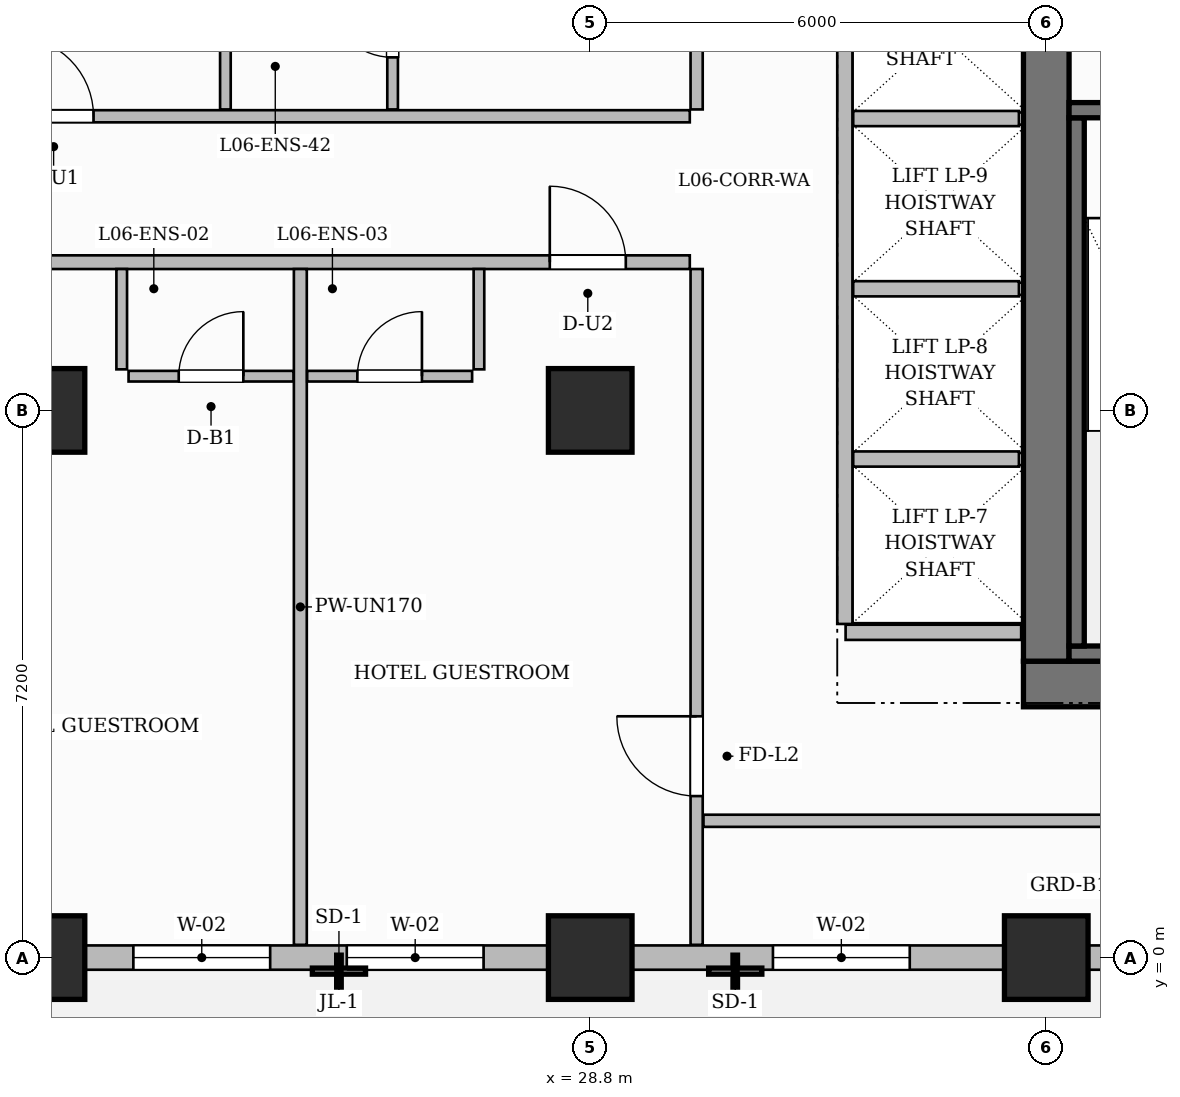
"""IFC4 building model, lengths in metres.
Left out: names, types, materials, properties, quantities, classifications, styles, units other than length and angle.
Written with IfcOpenShell. Run it as: python <this file> out.ifc"""

import sys

from ifc_helpers import new_model, si_unit, direction, frame, frame_2d, origin, origin_2d, place, context, subcontext, project, spatial, rectangle, extrude, source, transform, mapped, element, fill, save


model = new_model("IFC4")
c1 = context("Model", 3, precision=1e-05, world=origin(), true_north=direction((0.0, 1.0)))
c2 = subcontext(c1, "Body", "Model", "MODEL_VIEW")
j1 = project(units=[si_unit("LENGTHUNIT", "METRE"), si_unit("PLANEANGLEUNIT", "RADIAN")], contexts=[c1])
p1 = place(None, origin())
s1 = spatial("IfcSite", under=j1, at=p1, CompositionType="ELEMENT")
p2 = place(p1, origin())
s2 = spatial("IfcBuilding", under=s1, at=p2, CompositionType="ELEMENT")
p3 = place(p2, frame((0.0, 0.0, 32.4)))
s3 = spatial("IfcBuildingStorey", under=s2, at=p3, CompositionType="ELEMENT", Elevation=32.4)
p4 = place(p3, frame((34.5, 3.6, 0.0), z_axis=(0.0, 0.0, 1.0), x_axis=(1.0, 0.0, 0.0)))
e1 = element("IfcWall", 1, at=p4, inside=s3, PredefinedType="SHEAR", context=c2, shape_type="SweptSolid", body=[
    extrude(rectangle(XDim=15.6, YDim=0.6, at=frame_2d((7.8, 0.0))), origin(), (0.0, 0.0, 1.0), 3.7),
])
p5 = place(p4, frame((4.5, 0.0, 0.0)))
e2 = element("IfcOpeningElement", 2, at=p5, cuts=e1, PredefinedType="OPENING", context=c2, shape_type="SweptSolid", body=[
    extrude(rectangle(XDim=0.9, YDim=2.1, at=frame_2d((0.45, 1.05))), frame((0.0, 0.31, 0.0), z_axis=(0.0, -1.0, 0.0), x_axis=(1.0, 0.0, 0.0)), (0.0, 0.0, 1.0), 0.62),
])
p6 = place(p4, frame((6.95, 0.0, 0.0)))
e3 = element("IfcOpeningElement", 3, at=p6, cuts=e1, PredefinedType="OPENING", context=c2, shape_type="SweptSolid", body=[
    extrude(rectangle(XDim=0.9, YDim=2.1, at=frame_2d((0.45, 1.05))), frame((0.0, 0.31, 0.0), z_axis=(0.0, -1.0, 0.0), x_axis=(1.0, 0.0, 0.0)), (0.0, 0.0, 1.0), 0.62),
])
p7 = place(p3, frame((34.8, 3.9, 0.0), z_axis=(0.0, 0.0, 1.0), x_axis=(0.0, 1.0, 0.0)))
e4 = element("IfcWall", 4, at=p7, inside=s3, PredefinedType="SHEAR", context=c2, shape_type="SweptSolid", body=[
    extrude(rectangle(XDim=10.2, YDim=0.6, at=frame_2d((5.1, 0.0))), origin(), (0.0, 0.0, 1.0), 3.7),
])
m1 = source(origin(), c2, "Body", "SweptSolid", [
    extrude(rectangle(XDim=1.1, YDim=1.1, at=origin_2d()), origin(), (0.0, 0.0, 1.0), 3.7),
])
for number, where, z_axis, x_axis in (
    (5, (21.6, 0.0, 0.0), (0.0, 0.0, 1.0), (1.0, 0.0, 0.0)),
    (6, (21.6, 7.2, 0.0), (0.0, 0.0, 1.0), (1.0, 0.0, 0.0)),
    (7, (28.8, 0.0, 0.0), (0.0, 0.0, 1.0), (1.0, 0.0, 0.0)),
    (8, (28.8, 7.2, 0.0), (0.0, 0.0, 1.0), (1.0, 0.0, 0.0)),
    (9, (34.8, 0.0, 0.0), (0.0, 0.0, 1.0), (1.0, 0.0, 0.0)),
):
    element("IfcColumn", number, at=place(p3, frame(where, z_axis=z_axis, x_axis=x_axis)), inside=s3, PredefinedType="COLUMN", context=c2, shape_type="MappedRepresentation", body=[
        mapped(m1, transform((0.0, 0.0, 0.0), scale=1.0)),
    ])
p8 = place(p3, frame((35.1, 4.0, 0.0), z_axis=(0.0, 0.0, 1.0), x_axis=(1.0, 0.0, 0.0)))
e10 = element("IfcWall", 10, at=p8, inside=s3, PredefinedType="SHEAR", context=c2, shape_type="SweptSolid", body=[
    extrude(rectangle(XDim=3.14, YDim=0.2, at=frame_2d((1.57, 0.0))), origin(), (0.0, 0.0, 1.0), 3.7),
])
p9 = place(p3, frame((35.2, 4.1, 0.0), z_axis=(0.0, 0.0, 1.0), x_axis=(0.0, 1.0, 0.0)))
e11 = element("IfcWall", 11, at=p9, inside=s3, PredefinedType="SHEAR", context=c2, shape_type="SweptSolid", body=[
    extrude(rectangle(XDim=6.95, YDim=0.2, at=frame_2d((3.475, 0.0))), origin(), (0.0, 0.0, 1.0), 3.7),
])
p10 = place(p3, frame((35.1, 11.15, 0.0), z_axis=(0.0, 0.0, 1.0), x_axis=(1.0, 0.0, 0.0)))
e12 = element("IfcWall", 12, at=p10, inside=s3, PredefinedType="SHEAR", context=c2, shape_type="SweptSolid", body=[
    extrude(rectangle(XDim=3.14, YDim=0.2, at=frame_2d((1.57, 0.0))), origin(), (0.0, 0.0, 1.0), 3.7),
])
p11 = place(p10, frame((1.045, 0.0, 0.0)))
e13 = element("IfcOpeningElement", 13, at=p11, cuts=e12, PredefinedType="OPENING", context=c2, shape_type="SweptSolid", body=[
    extrude(rectangle(XDim=1.05, YDim=2.2, at=frame_2d((0.525, 1.1))), frame((0.0, 0.11, 0.0), z_axis=(0.0, -1.0, 0.0), x_axis=(1.0, 0.0, 0.0)), (0.0, 0.0, 1.0), 0.22),
])
p12 = place(p3, frame((32.16, 4.28, 0.0), z_axis=(0.0, 0.0, 1.0), x_axis=(1.0, 0.0, 0.0)))
e14 = element("IfcWall", 14, at=p12, inside=s3, PredefinedType="PARTITIONING", context=c2, shape_type="SweptSolid", body=[
    extrude(rectangle(XDim=2.31, YDim=0.2, at=frame_2d((1.155, 0.0))), origin(), (0.0, 0.0, 1.0), 3.45),
])
p13 = place(p3, frame((32.15, 4.39, 0.0), z_axis=(0.0, 0.0, 1.0), x_axis=(0.0, 1.0, 0.0)))
e15 = element("IfcWall", 15, at=p13, inside=s3, PredefinedType="PARTITIONING", context=c2, shape_type="SweptSolid", body=[
    extrude(rectangle(XDim=8.82, YDim=0.2, at=frame_2d((4.41, 0.0))), origin(), (0.0, 0.0, 1.0), 3.45),
])
for number, where, z_axis, x_axis in (
    (16, (32.26, 6.56, 0.0), (0.0, 0.0, 1.0), (1.0, 0.0, 0.0)),
    (17, (32.26, 8.8, 0.0), (0.0, 0.0, 1.0), (1.0, 0.0, 0.0)),
    (18, (32.26, 11.04, 0.0), (0.0, 0.0, 1.0), (1.0, 0.0, 0.0)),
):
    element("IfcWall", number, at=place(p3, frame(where, z_axis=z_axis, x_axis=x_axis)), inside=s3, PredefinedType="PARTITIONING", context=c2, shape_type="SweptSolid", body=[
        extrude(rectangle(XDim=2.18, YDim=0.2, at=frame_2d((1.09, 0.0))), origin(), (0.0, 0.0, 1.0), 3.45),
    ])
p14 = place(p3, frame((14.568, 9.15, 0.0), z_axis=(0.0, 0.0, 1.0), x_axis=(1.0, 0.0, 0.0)))
e19 = element("IfcWall", 19, at=p14, inside=s3, PredefinedType="PARTITIONING", context=c2, shape_type="SweptSolid", body=[
    extrude(rectangle(XDim=15.542, YDim=0.18, at=frame_2d((7.771, 0.0))), origin(), (0.0, 0.0, 1.0), 3.45),
])
p15 = place(p14, frame((2.888, 0.0, 0.0)))
e20 = element("IfcOpeningElement", 20, at=p15, cuts=e19, PredefinedType="OPENING", context=c2, shape_type="SweptSolid", body=[
    extrude(rectangle(XDim=1.0, YDim=2.2, at=frame_2d((0.5, 1.1))), frame((0.0, 0.1, 0.0), z_axis=(0.0, -1.0, 0.0), x_axis=(1.0, 0.0, 0.0)), (0.0, 0.0, 1.0), 0.2),
])
p16 = place(p14, frame((5.314, 0.0, 0.0)))
e21 = element("IfcOpeningElement", 21, at=p16, cuts=e19, PredefinedType="OPENING", context=c2, shape_type="SweptSolid", body=[
    extrude(rectangle(XDim=1.05, YDim=2.25, at=frame_2d((0.525, 1.125))), frame((0.0, 0.1, 0.0), z_axis=(0.0, -1.0, 0.0), x_axis=(1.0, 0.0, 0.0)), (0.0, 0.0, 1.0), 0.2),
])
p17 = place(p14, frame((13.7, 0.0, 0.0)))
e22 = element("IfcOpeningElement", 22, at=p17, cuts=e19, PredefinedType="OPENING", context=c2, shape_type="SweptSolid", body=[
    extrude(rectangle(XDim=1.0, YDim=2.2, at=frame_2d((0.5, 1.1))), frame((0.0, 0.1, 0.0), z_axis=(0.0, -1.0, 0.0), x_axis=(1.0, 0.0, 0.0)), (0.0, 0.0, 1.0), 0.2),
])
p18 = place(p3, frame((14.568, 11.07, 0.0), z_axis=(0.0, 0.0, 1.0), x_axis=(1.0, 0.0, 0.0)))
e23 = element("IfcWall", 23, at=p18, inside=s3, PredefinedType="PARTITIONING", context=c2, shape_type="SweptSolid", body=[
    extrude(rectangle(XDim=15.542, YDim=0.16, at=frame_2d((7.771, 0.0))), origin(), (0.0, 0.0, 1.0), 3.45),
])
p19 = place(p18, frame((2.918, 0.0, 0.0)))
e24 = element("IfcOpeningElement", 24, at=p19, cuts=e23, PredefinedType="OPENING", context=c2, shape_type="SweptSolid", body=[
    extrude(rectangle(XDim=1.0, YDim=2.2, at=frame_2d((0.5, 1.1))), frame((0.0, 0.09, 0.0), z_axis=(0.0, -1.0, 0.0), x_axis=(1.0, 0.0, 0.0)), (0.0, 0.0, 1.0), 0.18),
])
p20 = place(p18, frame((6.647, 0.0, 0.0)))
e25 = element("IfcOpeningElement", 25, at=p20, cuts=e23, PredefinedType="OPENING", context=c2, shape_type="SweptSolid", body=[
    extrude(rectangle(XDim=1.05, YDim=2.25, at=frame_2d((0.525, 1.125))), frame((0.0, 0.09, 0.0), z_axis=(0.0, -1.0, 0.0), x_axis=(1.0, 0.0, 0.0)), (0.0, 0.0, 1.0), 0.18),
])
p21 = place(p3, frame((30.2, 11.16, 0.0), z_axis=(0.0, 0.0, 1.0), x_axis=(0.0, 1.0, 0.0)))
e26 = element("IfcWall", 26, at=p21, inside=s3, PredefinedType="PARTITIONING", context=c2, shape_type="SweptSolid", body=[
    extrude(rectangle(XDim=10.3, YDim=0.16, at=frame_2d((5.15, 0.0))), origin(), (0.0, 0.0, 1.0), 3.45),
])
p22 = place(p3, frame((30.2, 0.168, 0.0), z_axis=(0.0, 0.0, 1.0), x_axis=(0.0, 1.0, 0.0)))
e27 = element("IfcWall", 27, at=p22, inside=s3, PredefinedType="PARTITIONING", context=c2, shape_type="SweptSolid", body=[
    extrude(rectangle(XDim=8.892, YDim=0.16, at=frame_2d((4.446, 0.0))), origin(), (0.0, 0.0, 1.0), 3.45),
])
p23 = place(p22, frame((1.957, 0.0, 0.0)))
e28 = element("IfcOpeningElement", 28, at=p23, cuts=e27, PredefinedType="OPENING", context=c2, shape_type="SweptSolid", body=[
    extrude(rectangle(XDim=1.05, YDim=2.15, at=frame_2d((0.525, 1.075))), frame((0.0, 0.09, 0.0), z_axis=(0.0, -1.0, 0.0), x_axis=(1.0, 0.0, 0.0)), (0.0, 0.0, 1.0), 0.18),
])
p24 = place(p3, frame((30.29, 1.8, 0.0), z_axis=(0.0, 0.0, 1.0), x_axis=(1.0, 0.0, 0.0)))
e29 = element("IfcWall", 29, at=p24, inside=s3, PredefinedType="PARTITIONING", context=c2, shape_type="SweptSolid", body=[
    extrude(rectangle(XDim=19.37, YDim=0.16, at=frame_2d((9.685, 0.0))), origin(), (0.0, 0.0, 1.0), 3.45),
])
p25 = place(p24, frame((9.735, 0.0, 0.0)))
e30 = element("IfcOpeningElement", 30, at=p25, cuts=e29, PredefinedType="OPENING", context=c2, shape_type="SweptSolid", body=[
    extrude(rectangle(XDim=0.95, YDim=2.15, at=frame_2d((0.475, 1.075))), frame((0.0, 0.09, 0.0), z_axis=(0.0, -1.0, 0.0), x_axis=(1.0, 0.0, 0.0)), (0.0, 0.0, 1.0), 0.18),
])
p26 = place(p3, frame((24.986, 0.168, 0.0), z_axis=(0.0, 0.0, 1.0), x_axis=(0.0, 1.0, 0.0)))
e31 = element("IfcWall", 31, at=p26, inside=s3, PredefinedType="PARTITIONING", context=c2, shape_type="SweptSolid", body=[
    extrude(rectangle(XDim=8.892, YDim=0.17, at=frame_2d((4.446, 0.0))), origin(), (0.0, 0.0, 1.0), 3.035),
])
p27 = place(p3, frame((22.636, 7.74, 0.0), z_axis=(0.0, 0.0, 1.0), x_axis=(0.0, 1.0, 0.0)))
e32 = element("IfcWall", 32, at=p27, inside=s3, PredefinedType="PARTITIONING", context=c2, shape_type="SweptSolid", body=[
    extrude(rectangle(XDim=1.32, YDim=0.14, at=frame_2d((0.66, 0.0))), origin(), (0.0, 0.0, 1.0), 3.45),
])
p28 = place(p3, frame((22.726, 7.65, 0.0), z_axis=(0.0, 0.0, 1.0), x_axis=(1.0, 0.0, 0.0)))
e33 = element("IfcWall", 33, at=p28, inside=s3, PredefinedType="PARTITIONING", context=c2, shape_type="SweptSolid", body=[
    extrude(rectangle(XDim=2.17, YDim=0.14, at=frame_2d((1.085, 0.0))), origin(), (0.0, 0.0, 1.0), 3.45),
])
p29 = place(p28, frame((0.66, 0.0, 0.0)))
e34 = element("IfcOpeningElement", 34, at=p29, cuts=e33, PredefinedType="OPENING", context=c2, shape_type="SweptSolid", body=[
    extrude(rectangle(XDim=0.85, YDim=2.1, at=frame_2d((0.425, 1.05))), frame((0.0, 0.08, 0.0), z_axis=(0.0, -1.0, 0.0), x_axis=(1.0, 0.0, 0.0)), (0.0, 0.0, 1.0), 0.16),
])
p30 = place(p3, frame((27.336, 7.74, 0.0), z_axis=(0.0, 0.0, 1.0), x_axis=(0.0, 1.0, 0.0)))
e35 = element("IfcWall", 35, at=p30, inside=s3, PredefinedType="PARTITIONING", context=c2, shape_type="SweptSolid", body=[
    extrude(rectangle(XDim=1.32, YDim=0.14, at=frame_2d((0.66, 0.0))), origin(), (0.0, 0.0, 1.0), 3.45),
])
p31 = place(p3, frame((25.076, 7.65, 0.0), z_axis=(0.0, 0.0, 1.0), x_axis=(1.0, 0.0, 0.0)))
e36 = element("IfcWall", 36, at=p31, inside=s3, PredefinedType="PARTITIONING", context=c2, shape_type="SweptSolid", body=[
    extrude(rectangle(XDim=2.17, YDim=0.14, at=frame_2d((1.085, 0.0))), origin(), (0.0, 0.0, 1.0), 3.45),
])
p32 = place(p31, frame((0.66, 0.0, 0.0)))
e37 = element("IfcOpeningElement", 37, at=p32, cuts=e36, PredefinedType="OPENING", context=c2, shape_type="SweptSolid", body=[
    extrude(rectangle(XDim=0.85, YDim=2.1, at=frame_2d((0.425, 1.05))), frame((0.0, 0.08, 0.0), z_axis=(0.0, -1.0, 0.0), x_axis=(1.0, 0.0, 0.0)), (0.0, 0.0, 1.0), 0.16),
])
p33 = place(p3, frame((24.0, 11.16, 0.0), z_axis=(0.0, 0.0, 1.0), x_axis=(0.0, 1.0, 0.0)))
e38 = element("IfcWall", 38, at=p33, inside=s3, PredefinedType="PARTITIONING", context=c2, shape_type="SweptSolid", body=[
    extrude(rectangle(XDim=2.22, YDim=0.14, at=frame_2d((1.11, 0.0))), origin(), (0.0, 0.0, 1.0), 3.45),
])
p34 = place(p3, frame((26.2, 11.16, 0.0), z_axis=(0.0, 0.0, 1.0), x_axis=(0.0, 1.0, 0.0)))
e39 = element("IfcWall", 39, at=p34, inside=s3, PredefinedType="PARTITIONING", context=c2, shape_type="SweptSolid", body=[
    extrude(rectangle(XDim=2.22, YDim=0.14, at=frame_2d((1.11, 0.0))), origin(), (0.0, 0.0, 1.0), 3.45),
])
p35 = place(p34, frame((0.685, 0.0, 0.0)))
e40 = element("IfcOpeningElement", 40, at=p35, cuts=e39, PredefinedType="OPENING", context=c2, shape_type="SweptSolid", body=[
    extrude(rectangle(XDim=0.85, YDim=2.1, at=frame_2d((0.425, 1.05))), frame((0.0, 0.08, 0.0), z_axis=(0.0, -1.0, 0.0), x_axis=(1.0, 0.0, 0.0)), (0.0, 0.0, 1.0), 0.16),
])
p36 = place(p3, frame((14.4, 0.0, 0.0), z_axis=(0.0, 0.0, 1.0), x_axis=(1.0, 0.0, 0.0)))
e41 = element("IfcWall", 41, at=p36, inside=s3, PredefinedType="SOLIDWALL", context=c2, shape_type="SweptSolid", body=[
    extrude(rectangle(XDim=43.2, YDim=0.32, at=frame_2d((21.6, 0.0))), origin(), (0.0, 0.0, 1.0), 2.885),
])
p37 = place(p36, frame((1.5, 0.0, 0.0)))
e42 = element("IfcOpeningElement", 42, at=p37, cuts=e41, PredefinedType="OPENING", context=c2, shape_type="SweptSolid", body=[
    extrude(rectangle(XDim=1.2, YDim=2.2, at=frame_2d((0.6, 1.1))), frame((0.0, 0.17, 0.0), z_axis=(0.0, -1.0, 0.0), x_axis=(1.0, 0.0, 0.0)), (0.0, 0.0, 1.0), 0.34),
])
p38 = place(p36, frame((3.336, 0.0, 0.8)))
e43 = element("IfcOpeningElement", 43, at=p38, cuts=e41, PredefinedType="OPENING", context=c2, shape_type="SweptSolid", body=[
    extrude(rectangle(XDim=1.4, YDim=1.85, at=frame_2d((0.7, 0.925))), frame((0.0, 0.17, 0.0), z_axis=(0.0, -1.0, 0.0), x_axis=(1.0, 0.0, 0.0)), (0.0, 0.0, 1.0), 0.34),
])
p39 = place(p36, frame((5.269, 0.0, 0.8)))
e44 = element("IfcOpeningElement", 44, at=p39, cuts=e41, PredefinedType="OPENING", context=c2, shape_type="SweptSolid", body=[
    extrude(rectangle(XDim=0.95, YDim=1.75, at=frame_2d((0.475, 0.875))), frame((0.0, 0.17, 0.0), z_axis=(0.0, -1.0, 0.0), x_axis=(1.0, 0.0, 0.0)), (0.0, 0.0, 1.0), 0.34),
])
p40 = place(p36, frame((8.389, 0.0, 0.8)))
e45 = element("IfcOpeningElement", 45, at=p40, cuts=e41, PredefinedType="OPENING", context=c2, shape_type="SweptSolid", body=[
    extrude(rectangle(XDim=1.8, YDim=1.85, at=frame_2d((0.9, 0.925))), frame((0.0, 0.17, 0.0), z_axis=(0.0, -1.0, 0.0), x_axis=(1.0, 0.0, 0.0)), (0.0, 0.0, 1.0), 0.34),
])
p41 = place(p36, frame((11.197, 0.0, 0.8)))
e46 = element("IfcOpeningElement", 46, at=p41, cuts=e41, PredefinedType="OPENING", context=c2, shape_type="SweptSolid", body=[
    extrude(rectangle(XDim=1.8, YDim=1.85, at=frame_2d((0.9, 0.925))), frame((0.0, 0.17, 0.0), z_axis=(0.0, -1.0, 0.0), x_axis=(1.0, 0.0, 0.0)), (0.0, 0.0, 1.0), 0.34),
])
p42 = place(p36, frame((16.804, 0.0, 0.8)))
e47 = element("IfcOpeningElement", 47, at=p42, cuts=e41, PredefinedType="OPENING", context=c2, shape_type="SweptSolid", body=[
    extrude(rectangle(XDim=1.8, YDim=1.85, at=frame_2d((0.9, 0.925))), frame((0.0, 0.17, 0.0), z_axis=(0.0, -1.0, 0.0), x_axis=(1.0, 0.0, 0.0)), (0.0, 0.0, 1.0), 0.34),
])
p43 = place(p36, frame((21.725, 0.0, 0.8)))
e48 = element("IfcOpeningElement", 48, at=p43, cuts=e41, PredefinedType="OPENING", context=c2, shape_type="SweptSolid", body=[
    extrude(rectangle(XDim=1.8, YDim=1.85, at=frame_2d((0.9, 0.925))), frame((0.0, 0.17, 0.0), z_axis=(0.0, -1.0, 0.0), x_axis=(1.0, 0.0, 0.0)), (0.0, 0.0, 1.0), 0.34),
])
p44 = place(p36, frame((24.475, 0.0, 0.8)))
e49 = element("IfcOpeningElement", 49, at=p44, cuts=e41, PredefinedType="OPENING", context=c2, shape_type="SweptSolid", body=[
    extrude(rectangle(XDim=1.8, YDim=1.85, at=frame_2d((0.9, 0.925))), frame((0.0, 0.17, 0.0), z_axis=(0.0, -1.0, 0.0), x_axis=(1.0, 0.0, 0.0)), (0.0, 0.0, 1.0), 0.34),
])
p45 = place(p36, frame((29.075, 0.0, 0.8)))
e50 = element("IfcOpeningElement", 50, at=p45, cuts=e41, PredefinedType="OPENING", context=c2, shape_type="SweptSolid", body=[
    extrude(rectangle(XDim=1.8, YDim=1.85, at=frame_2d((0.9, 0.925))), frame((0.0, 0.17, 0.0), z_axis=(0.0, -1.0, 0.0), x_axis=(1.0, 0.0, 0.0)), (0.0, 0.0, 1.0), 0.34),
])
p46 = place(p36, frame((32.125, 0.0, 0.8)))
e51 = element("IfcOpeningElement", 51, at=p46, cuts=e41, PredefinedType="OPENING", context=c2, shape_type="SweptSolid", body=[
    extrude(rectangle(XDim=1.8, YDim=1.85, at=frame_2d((0.9, 0.925))), frame((0.0, 0.17, 0.0), z_axis=(0.0, -1.0, 0.0), x_axis=(1.0, 0.0, 0.0)), (0.0, 0.0, 1.0), 0.34),
])
p47 = place(p36, frame((36.875, 0.0, 0.8)))
e52 = element("IfcOpeningElement", 52, at=p47, cuts=e41, PredefinedType="OPENING", context=c2, shape_type="SweptSolid", body=[
    extrude(rectangle(XDim=1.8, YDim=1.85, at=frame_2d((0.9, 0.925))), frame((0.0, 0.17, 0.0), z_axis=(0.0, -1.0, 0.0), x_axis=(1.0, 0.0, 0.0)), (0.0, 0.0, 1.0), 0.34),
])
p48 = place(p36, frame((39.925, 0.0, 0.8)))
e53 = element("IfcOpeningElement", 53, at=p48, cuts=e41, PredefinedType="OPENING", context=c2, shape_type="SweptSolid", body=[
    extrude(rectangle(XDim=1.8, YDim=1.85, at=frame_2d((0.9, 0.925))), frame((0.0, 0.17, 0.0), z_axis=(0.0, -1.0, 0.0), x_axis=(1.0, 0.0, 0.0)), (0.0, 0.0, 1.0), 0.34),
])
m2 = source(origin(), c2, "Body", "SweptSolid", [
    extrude(rectangle(XDim=1.05, YDim=2.15, at=frame_2d((0.525, 1.075))), frame((0.0, 0.025, 0.0), z_axis=(0.0, -1.0, 0.0), x_axis=(1.0, 0.0, 0.0)), (0.0, 0.0, 1.0), 0.05),
])
p49 = place(p23, origin())
e54 = element("IfcDoor", 54, at=p49, inside=s3, OperationType="SINGLE_SWING_RIGHT", PredefinedType="DOOR", context=c2, shape_type="MappedRepresentation", body=[
    mapped(m2, transform((0.0, 0.0, 0.0), scale=1.0)),
])
fill(e28, e54)
m3 = source(origin(), c2, "Body", "SweptSolid", [
    extrude(rectangle(XDim=0.85, YDim=2.1, at=frame_2d((0.425, 1.05))), frame((0.0, 0.025, 0.0), z_axis=(0.0, -1.0, 0.0), x_axis=(1.0, 0.0, 0.0)), (0.0, 0.0, 1.0), 0.05),
])
p50 = place(p29, origin())
e55 = element("IfcDoor", 55, at=p50, inside=s3, OperationType="SINGLE_SWING_RIGHT", PredefinedType="DOOR", context=c2, shape_type="MappedRepresentation", body=[
    mapped(m3, transform((0.0, 0.0, 0.0), scale=1.0)),
])
fill(e34, e55)
p51 = place(p32, origin())
e56 = element("IfcDoor", 56, at=p51, inside=s3, OperationType="SINGLE_SWING_RIGHT", PredefinedType="DOOR", context=c2, shape_type="MappedRepresentation", body=[
    mapped(m3, transform((0.0, 0.0, 0.0), scale=1.0)),
])
fill(e37, e56)
m4 = source(origin(), c2, "Body", "SweptSolid", [
    extrude(rectangle(XDim=1.0, YDim=2.2, at=frame_2d((0.5, 1.1))), frame((0.0, 0.025, 0.0), z_axis=(0.0, -1.0, 0.0), x_axis=(1.0, 0.0, 0.0)), (0.0, 0.0, 1.0), 0.05),
])
p52 = place(p17, origin())
e57 = element("IfcDoor", 57, at=p52, inside=s3, OperationType="SINGLE_SWING_LEFT", PredefinedType="DOOR", context=c2, shape_type="MappedRepresentation", body=[
    mapped(m4, transform((0.0, 0.0, 0.0), scale=1.0)),
])
fill(e22, e57)
p53 = place(p35, origin())
e58 = element("IfcDoor", 58, at=p53, inside=s3, OperationType="SINGLE_SWING_RIGHT", PredefinedType="DOOR", context=c2, shape_type="MappedRepresentation", body=[
    mapped(m3, transform((0.0, 0.0, 0.0), scale=1.0)),
])
fill(e40, e58)
m5 = source(origin(), c2, "Body", "SweptSolid", [
    extrude(rectangle(XDim=1.05, YDim=2.25, at=frame_2d((0.525, 1.125))), frame((0.0, 0.025, 0.0), z_axis=(0.0, -1.0, 0.0), x_axis=(1.0, 0.0, 0.0)), (0.0, 0.0, 1.0), 0.05),
])
p54 = place(p20, origin())
e59 = element("IfcDoor", 59, at=p54, inside=s3, OperationType="SINGLE_SWING_LEFT", PredefinedType="DOOR", context=c2, shape_type="MappedRepresentation", body=[
    mapped(m5, transform((0.0, 0.0, 0.0), scale=1.0)),
])
fill(e25, e59)
m6 = source(origin(), c2, "Body", "SweptSolid", [
    extrude(rectangle(XDim=1.8, YDim=1.85, at=frame_2d((0.9, 0.925))), frame((0.0, 0.03, 0.0), z_axis=(0.0, -1.0, 0.0), x_axis=(1.0, 0.0, 0.0)), (0.0, 0.0, 1.0), 0.06),
])
p55 = place(p40, origin())
e60 = element("IfcWindow", 60, at=p55, inside=s3, PartitioningType="DOUBLE_PANEL_VERTICAL", PredefinedType="WINDOW", context=c2, shape_type="MappedRepresentation", body=[
    mapped(m6, transform((0.0, 0.0, 0.0), scale=1.0)),
])
fill(e45, e60)
p56 = place(p41, origin())
e61 = element("IfcWindow", 61, at=p56, inside=s3, PartitioningType="DOUBLE_PANEL_VERTICAL", PredefinedType="WINDOW", context=c2, shape_type="MappedRepresentation", body=[
    mapped(m6, transform((0.0, 0.0, 0.0), scale=1.0)),
])
fill(e46, e61)
p57 = place(p42, origin())
e62 = element("IfcWindow", 62, at=p57, inside=s3, PartitioningType="DOUBLE_PANEL_VERTICAL", PredefinedType="WINDOW", context=c2, shape_type="MappedRepresentation", body=[
    mapped(m6, transform((0.0, 0.0, 0.0), scale=1.0)),
])
fill(e47, e62)
save(model, sys.argv[1])
